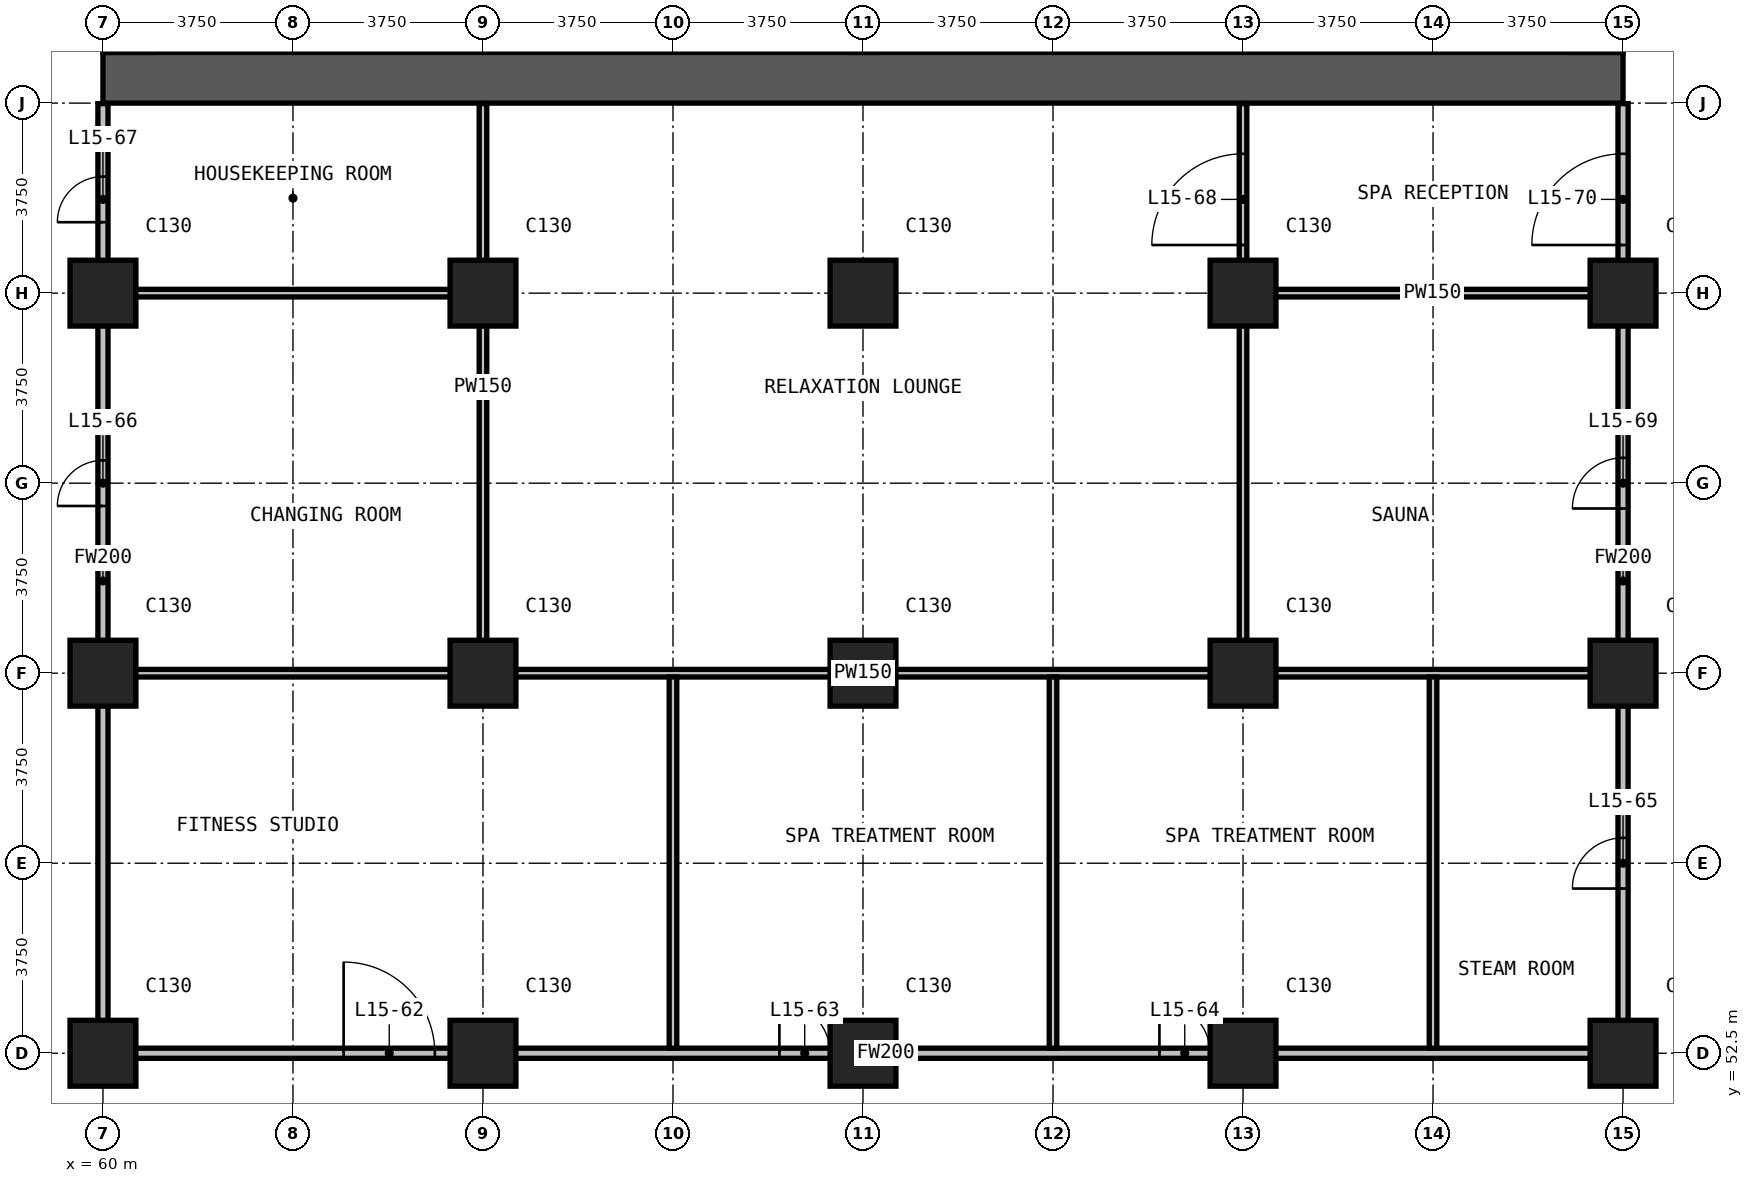
"""IFC4 building model, lengths in metres.
Left out: names, types, materials, properties, quantities, classifications, styles, units other than length and angle.
Written with IfcOpenShell. Run it as: python <this file> out.ifc"""

import sys

from ifc_helpers import new_model, si_unit, direction, frame, frame_2d, origin, origin_2d, place, context, subcontext, project, spatial, rectangle, extrude, element, fill, save


model = new_model("IFC4")
c1 = context("Model", 3, precision=1e-05, world=origin(), true_north=direction((0.0, 1.0)))
c2 = subcontext(c1, "Body", "Model", "MODEL_VIEW")
j1 = project(units=[si_unit("LENGTHUNIT", "METRE"), si_unit("PLANEANGLEUNIT", "RADIAN")], contexts=[c1])
p1 = place(None, origin())
s1 = spatial("IfcSite", under=j1, at=p1, CompositionType="ELEMENT")
p2 = place(p1, origin())
s2 = spatial("IfcBuilding", under=s1, at=p2, CompositionType="ELEMENT")
p3 = place(p2, frame((0.0, 0.0, 69.2)))
s3 = spatial("IfcBuildingStorey", under=s2, at=p3, CompositionType="ELEMENT", Elevation=69.2)
for number, where, z_axis, x_axis in (
    (1, (60.0, 52.5, 0.0), (0.0, 0.0, 1.0), (1.0, 0.0, 0.0)),
    (2, (60.0, 60.0, 0.0), (0.0, 0.0, 1.0), (1.0, 0.0, 0.0)),
    (3, (60.0, 67.5, 0.0), (0.0, 0.0, 1.0), (1.0, 0.0, 0.0)),
    (4, (67.5, 52.5, 0.0), (0.0, 0.0, 1.0), (1.0, 0.0, 0.0)),
    (5, (67.5, 60.0, 0.0), (0.0, 0.0, 1.0), (1.0, 0.0, 0.0)),
    (6, (67.5, 67.5, 0.0), (0.0, 0.0, 1.0), (1.0, 0.0, 0.0)),
    (7, (75.0, 52.5, 0.0), (0.0, 0.0, 1.0), (1.0, 0.0, 0.0)),
    (8, (75.0, 60.0, 0.0), (0.0, 0.0, 1.0), (1.0, 0.0, 0.0)),
    (9, (75.0, 67.5, 0.0), (0.0, 0.0, 1.0), (1.0, 0.0, 0.0)),
    (10, (82.5, 52.5, 0.0), (0.0, 0.0, 1.0), (1.0, 0.0, 0.0)),
    (11, (82.5, 60.0, 0.0), (0.0, 0.0, 1.0), (1.0, 0.0, 0.0)),
    (12, (82.5, 67.5, 0.0), (0.0, 0.0, 1.0), (1.0, 0.0, 0.0)),
    (13, (90.0, 52.5, 0.0), (0.0, 0.0, 1.0), (1.0, 0.0, 0.0)),
    (14, (90.0, 60.0, 0.0), (0.0, 0.0, 1.0), (1.0, 0.0, 0.0)),
    (15, (90.0, 67.5, 0.0), (0.0, 0.0, 1.0), (1.0, 0.0, 0.0)),
):
    element("IfcColumn", number, at=place(p3, frame(where, z_axis=z_axis, x_axis=x_axis)), inside=s3, PredefinedType="COLUMN", context=c2, shape_type="SweptSolid", body=[
        extrude(rectangle(XDim=1.3, YDim=1.3, at=origin_2d()), origin(), (0.0, 0.0, 1.0), 3.3),
    ])
p4 = place(p3, frame((60.0, 71.75, 0.0), z_axis=(0.0, 0.0, 1.0), x_axis=(1.0, 0.0, 0.0)))
e16 = element("IfcWall", 16, at=p4, inside=s3, PredefinedType="SHEAR", context=c2, shape_type="SweptSolid", body=[
    extrude(rectangle(XDim=30.0, YDim=1.0, at=frame_2d((15.0, 0.0))), origin(), (0.0, 0.0, 1.0), 3.3),
])
p5 = place(p3, frame((60.1, 52.5, 0.0), z_axis=(0.0, 0.0, 1.0), x_axis=(1.0, 0.0, 0.0)))
e17 = element("IfcWall", 17, at=p5, inside=s3, PredefinedType="PARTITIONING", context=c2, shape_type="SweptSolid", body=[
    extrude(rectangle(XDim=29.8, YDim=0.2, at=frame_2d((14.9, 0.0))), origin(), (0.0, 0.0, 1.0), 3.0),
])
p6 = place(p5, frame((4.65, 0.0, 0.0)))
e18 = element("IfcOpeningElement", 18, at=p6, cuts=e17, PredefinedType="OPENING", context=c2, shape_type="SweptSolid", body=[
    extrude(rectangle(XDim=1.8, YDim=2.2, at=frame_2d((0.9, 1.1))), frame((0.0, 0.11, 0.0), z_axis=(0.0, -1.0, 0.0), x_axis=(1.0, 0.0, 0.0)), (0.0, 0.0, 1.0), 0.22),
])
p7 = place(p5, frame((13.25, 0.0, 0.0)))
e19 = element("IfcOpeningElement", 19, at=p7, cuts=e17, PredefinedType="OPENING", context=c2, shape_type="SweptSolid", body=[
    extrude(rectangle(XDim=1.0, YDim=2.2, at=frame_2d((0.5, 1.1))), frame((0.0, 0.11, 0.0), z_axis=(0.0, -1.0, 0.0), x_axis=(1.0, 0.0, 0.0)), (0.0, 0.0, 1.0), 0.22),
])
p8 = place(p5, frame((20.75, 0.0, 0.0)))
e20 = element("IfcOpeningElement", 20, at=p8, cuts=e17, PredefinedType="OPENING", context=c2, shape_type="SweptSolid", body=[
    extrude(rectangle(XDim=1.0, YDim=2.2, at=frame_2d((0.5, 1.1))), frame((0.0, 0.11, 0.0), z_axis=(0.0, -1.0, 0.0), x_axis=(1.0, 0.0, 0.0)), (0.0, 0.0, 1.0), 0.22),
])
p9 = place(p3, frame((60.0, 52.4, 0.0), z_axis=(0.0, 0.0, 1.0), x_axis=(0.0, 1.0, 0.0)))
e21 = element("IfcWall", 21, at=p9, inside=s3, PredefinedType="PARTITIONING", context=c2, shape_type="SweptSolid", body=[
    extrude(rectangle(XDim=18.84, YDim=0.2, at=frame_2d((9.42, 0.0))), origin(), (0.0, 0.0, 1.0), 3.0),
])
p10 = place(p9, frame((10.9, 0.0, 0.0)))
e22 = element("IfcOpeningElement", 22, at=p10, cuts=e21, PredefinedType="OPENING", context=c2, shape_type="SweptSolid", body=[
    extrude(rectangle(XDim=0.9, YDim=2.2, at=frame_2d((0.45, 1.1))), frame((0.0, 0.11, 0.0), z_axis=(0.0, -1.0, 0.0), x_axis=(1.0, 0.0, 0.0)), (0.0, 0.0, 1.0), 0.22),
])
p11 = place(p9, frame((16.5, 0.0, 0.0)))
e23 = element("IfcOpeningElement", 23, at=p11, cuts=e21, PredefinedType="OPENING", context=c2, shape_type="SweptSolid", body=[
    extrude(rectangle(XDim=0.9, YDim=2.2, at=frame_2d((0.45, 1.1))), frame((0.0, 0.11, 0.0), z_axis=(0.0, -1.0, 0.0), x_axis=(1.0, 0.0, 0.0)), (0.0, 0.0, 1.0), 0.22),
])
p12 = place(p3, frame((90.0, 52.4, 0.0), z_axis=(0.0, 0.0, 1.0), x_axis=(0.0, 1.0, 0.0)))
e24 = element("IfcWall", 24, at=p12, inside=s3, PredefinedType="PARTITIONING", context=c2, shape_type="SweptSolid", body=[
    extrude(rectangle(XDim=18.84, YDim=0.2, at=frame_2d((9.42, 0.0))), origin(), (0.0, 0.0, 1.0), 3.0),
])
p13 = place(p12, frame((3.35, 0.0, 0.0)))
e25 = element("IfcOpeningElement", 25, at=p13, cuts=e24, PredefinedType="OPENING", context=c2, shape_type="SweptSolid", body=[
    extrude(rectangle(XDim=1.0, YDim=2.2, at=frame_2d((0.5, 1.1))), frame((0.0, 0.11, 0.0), z_axis=(0.0, -1.0, 0.0), x_axis=(1.0, 0.0, 0.0)), (0.0, 0.0, 1.0), 0.22),
])
p14 = place(p12, frame((10.85, 0.0, 0.0)))
e26 = element("IfcOpeningElement", 26, at=p14, cuts=e24, PredefinedType="OPENING", context=c2, shape_type="SweptSolid", body=[
    extrude(rectangle(XDim=1.0, YDim=2.2, at=frame_2d((0.5, 1.1))), frame((0.0, 0.11, 0.0), z_axis=(0.0, -1.0, 0.0), x_axis=(1.0, 0.0, 0.0)), (0.0, 0.0, 1.0), 0.22),
])
p15 = place(p12, frame((16.05, 0.0, 0.0)))
e27 = element("IfcOpeningElement", 27, at=p15, cuts=e24, PredefinedType="OPENING", context=c2, shape_type="SweptSolid", body=[
    extrude(rectangle(XDim=1.8, YDim=2.2, at=frame_2d((0.9, 1.1))), frame((0.0, 0.11, 0.0), z_axis=(0.0, -1.0, 0.0), x_axis=(1.0, 0.0, 0.0)), (0.0, 0.0, 1.0), 0.22),
])
p16 = place(p3, frame((60.1, 60.0, 0.0), z_axis=(0.0, 0.0, 1.0), x_axis=(1.0, 0.0, 0.0)))
e28 = element("IfcWall", 28, at=p16, inside=s3, PredefinedType="PARTITIONING", context=c2, shape_type="SweptSolid", body=[
    extrude(rectangle(XDim=29.8, YDim=0.15, at=frame_2d((14.9, 0.0))), origin(), (0.0, 0.0, 1.0), 3.0),
])
for number, where, z_axis, x_axis in (
    (29, (60.1, 67.5, 0.0), (0.0, 0.0, 1.0), (1.0, 0.0, 0.0)),
    (30, (82.575, 67.5, 0.0), (0.0, 0.0, 1.0), (1.0, 0.0, 0.0)),
):
    element("IfcWall", number, at=place(p3, frame(where, z_axis=z_axis, x_axis=x_axis)), inside=s3, PredefinedType="PARTITIONING", context=c2, shape_type="SweptSolid", body=[
        extrude(rectangle(XDim=7.325, YDim=0.15, at=frame_2d((3.663, 0.0))), origin(), (0.0, 0.0, 1.0), 3.0),
    ])
p17 = place(p3, frame((67.5, 60.075, 0.0), z_axis=(0.0, 0.0, 1.0), x_axis=(0.0, 1.0, 0.0)))
e31 = element("IfcWall", 31, at=p17, inside=s3, PredefinedType="PARTITIONING", context=c2, shape_type="SweptSolid", body=[
    extrude(rectangle(XDim=11.165, YDim=0.15, at=frame_2d((5.583, 0.0))), origin(), (0.0, 0.0, 1.0), 3.0),
])
for number, where, z_axis, x_axis in (
    (32, (71.25, 52.6, 0.0), (0.0, 0.0, 1.0), (0.0, 1.0, 0.0)),
    (33, (78.75, 52.6, 0.0), (0.0, 0.0, 1.0), (0.0, 1.0, 0.0)),
):
    element("IfcWall", number, at=place(p3, frame(where, z_axis=z_axis, x_axis=x_axis)), inside=s3, PredefinedType="PARTITIONING", context=c2, shape_type="SweptSolid", body=[
        extrude(rectangle(XDim=7.325, YDim=0.15, at=frame_2d((3.663, 0.0))), origin(), (0.0, 0.0, 1.0), 3.0),
    ])
p18 = place(p3, frame((82.5, 60.075, 0.0), z_axis=(0.0, 0.0, 1.0), x_axis=(0.0, 1.0, 0.0)))
e34 = element("IfcWall", 34, at=p18, inside=s3, PredefinedType="PARTITIONING", context=c2, shape_type="SweptSolid", body=[
    extrude(rectangle(XDim=11.165, YDim=0.15, at=frame_2d((5.583, 0.0))), origin(), (0.0, 0.0, 1.0), 3.0),
])
p19 = place(p18, frame((8.375, 0.0, 0.0)))
e35 = element("IfcOpeningElement", 35, at=p19, cuts=e34, PredefinedType="OPENING", context=c2, shape_type="SweptSolid", body=[
    extrude(rectangle(XDim=1.8, YDim=2.2, at=frame_2d((0.9, 1.1))), frame((0.0, 0.085, 0.0), z_axis=(0.0, -1.0, 0.0), x_axis=(1.0, 0.0, 0.0)), (0.0, 0.0, 1.0), 0.17),
])
p20 = place(p3, frame((86.25, 52.6, 0.0), z_axis=(0.0, 0.0, 1.0), x_axis=(0.0, 1.0, 0.0)))
e36 = element("IfcWall", 36, at=p20, inside=s3, PredefinedType="PARTITIONING", context=c2, shape_type="SweptSolid", body=[
    extrude(rectangle(XDim=7.325, YDim=0.15, at=frame_2d((3.663, 0.0))), origin(), (0.0, 0.0, 1.0), 3.0),
])
p21 = place(p6, origin())
e37 = element("IfcDoor", 37, at=p21, inside=s3, OperationType="DOUBLE_DOOR_SINGLE_SWING", PredefinedType="DOOR", context=c2, shape_type="SweptSolid", body=[
    extrude(rectangle(XDim=1.8, YDim=2.2, at=frame_2d((0.9, 1.1))), frame((0.0, 0.025, 0.0), z_axis=(0.0, -1.0, 0.0), x_axis=(1.0, 0.0, 0.0)), (0.0, 0.0, 1.0), 0.05),
])
fill(e18, e37)
p22 = place(p7, origin())
e38 = element("IfcDoor", 38, at=p22, inside=s3, OperationType="SINGLE_SWING_LEFT", PredefinedType="DOOR", context=c2, shape_type="SweptSolid", body=[
    extrude(rectangle(XDim=1.0, YDim=2.2, at=frame_2d((0.5, 1.1))), frame((0.0, 0.025, 0.0), z_axis=(0.0, -1.0, 0.0), x_axis=(1.0, 0.0, 0.0)), (0.0, 0.0, 1.0), 0.05),
])
fill(e19, e38)
p23 = place(p8, origin())
e39 = element("IfcDoor", 39, at=p23, inside=s3, OperationType="SINGLE_SWING_LEFT", PredefinedType="DOOR", context=c2, shape_type="SweptSolid", body=[
    extrude(rectangle(XDim=1.0, YDim=2.2, at=frame_2d((0.5, 1.1))), frame((0.0, 0.025, 0.0), z_axis=(0.0, -1.0, 0.0), x_axis=(1.0, 0.0, 0.0)), (0.0, 0.0, 1.0), 0.05),
])
fill(e20, e39)
p24 = place(p13, origin())
e40 = element("IfcDoor", 40, at=p24, inside=s3, OperationType="SINGLE_SWING_RIGHT", PredefinedType="DOOR", context=c2, shape_type="SweptSolid", body=[
    extrude(rectangle(XDim=1.0, YDim=2.2, at=frame_2d((0.5, 1.1))), frame((0.0, 0.025, 0.0), z_axis=(0.0, -1.0, 0.0), x_axis=(1.0, 0.0, 0.0)), (0.0, 0.0, 1.0), 0.05),
])
fill(e25, e40)
p25 = place(p10, origin())
e41 = element("IfcDoor", 41, at=p25, inside=s3, OperationType="SINGLE_SWING_LEFT", PredefinedType="DOOR", context=c2, shape_type="SweptSolid", body=[
    extrude(rectangle(XDim=0.9, YDim=2.2, at=frame_2d((0.45, 1.1))), frame((0.0, 0.025, 0.0), z_axis=(0.0, -1.0, 0.0), x_axis=(1.0, 0.0, 0.0)), (0.0, 0.0, 1.0), 0.05),
])
fill(e22, e41)
p26 = place(p11, origin())
e42 = element("IfcDoor", 42, at=p26, inside=s3, OperationType="SINGLE_SWING_RIGHT", PredefinedType="DOOR", context=c2, shape_type="SweptSolid", body=[
    extrude(rectangle(XDim=0.9, YDim=2.2, at=frame_2d((0.45, 1.1))), frame((0.0, 0.025, 0.0), z_axis=(0.0, -1.0, 0.0), x_axis=(1.0, 0.0, 0.0)), (0.0, 0.0, 1.0), 0.05),
])
fill(e23, e42)
p27 = place(p19, origin())
e43 = element("IfcDoor", 43, at=p27, inside=s3, OperationType="DOUBLE_DOOR_SINGLE_SWING", PredefinedType="DOOR", context=c2, shape_type="SweptSolid", body=[
    extrude(rectangle(XDim=1.8, YDim=2.2, at=frame_2d((0.9, 1.1))), frame((0.0, 0.025, 0.0), z_axis=(0.0, -1.0, 0.0), x_axis=(1.0, 0.0, 0.0)), (0.0, 0.0, 1.0), 0.05),
])
fill(e35, e43)
p28 = place(p14, origin())
e44 = element("IfcDoor", 44, at=p28, inside=s3, OperationType="SINGLE_SWING_LEFT", PredefinedType="DOOR", context=c2, shape_type="SweptSolid", body=[
    extrude(rectangle(XDim=1.0, YDim=2.2, at=frame_2d((0.5, 1.1))), frame((0.0, 0.025, 0.0), z_axis=(0.0, -1.0, 0.0), x_axis=(1.0, 0.0, 0.0)), (0.0, 0.0, 1.0), 0.05),
])
fill(e26, e44)
p29 = place(p15, origin())
e45 = element("IfcDoor", 45, at=p29, inside=s3, OperationType="DOUBLE_DOOR_SINGLE_SWING", PredefinedType="DOOR", context=c2, shape_type="SweptSolid", body=[
    extrude(rectangle(XDim=1.8, YDim=2.2, at=frame_2d((0.9, 1.1))), frame((0.0, 0.025, 0.0), z_axis=(0.0, -1.0, 0.0), x_axis=(1.0, 0.0, 0.0)), (0.0, 0.0, 1.0), 0.05),
])
fill(e27, e45)
save(model, sys.argv[1])
